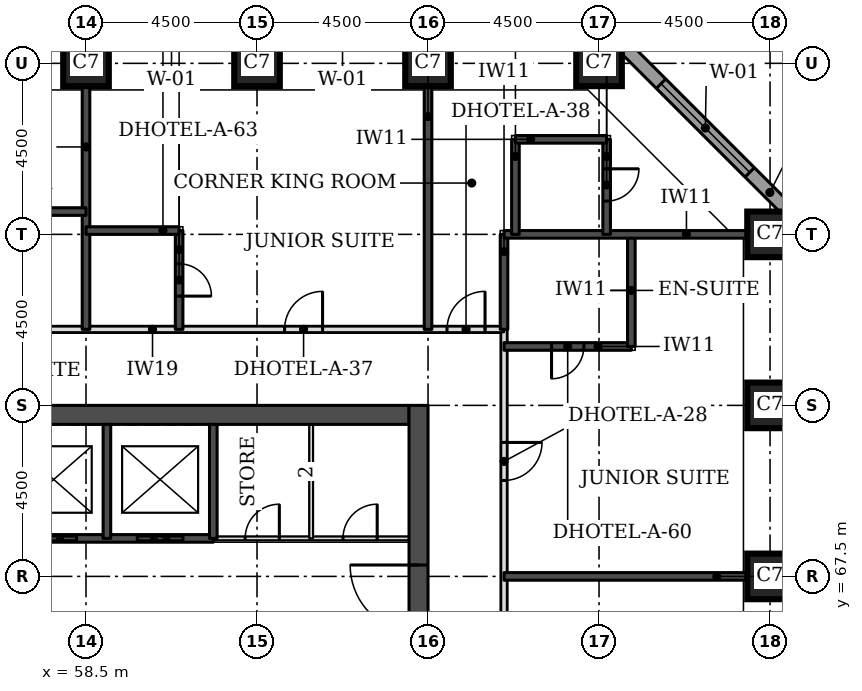
"""IFC4 building model, lengths in metres.
Left out: names, types, materials, properties, quantities, classifications, styles, units other than length and angle.
Written with IfcOpenShell. Run it as: python <this file> out.ifc"""

import sys

from ifc_helpers import new_model, si_unit, direction, frame, frame_2d, origin, origin_2d, place, context, subcontext, project, spatial, rectangle, extrude, element, fill, save


model = new_model("IFC4")
c1 = context("Model", 3, precision=1e-05, world=origin(), true_north=direction((0.0, 1.0)))
c2 = subcontext(c1, "Body", "Model", "MODEL_VIEW")
j1 = project(units=[si_unit("LENGTHUNIT", "METRE"), si_unit("PLANEANGLEUNIT", "RADIAN")], contexts=[c1])
p1 = place(None, origin())
s1 = spatial("IfcSite", under=j1, at=p1, CompositionType="ELEMENT")
p2 = place(p1, origin())
s2 = spatial("IfcBuilding", under=s1, at=p2, CompositionType="ELEMENT")
p3 = place(p2, frame((0.0, 0.0, 49.5)))
s3 = spatial("IfcBuildingStorey", under=s2, at=p3, CompositionType="ELEMENT", Elevation=49.5)
for number, where, z_axis, x_axis in (
    (1, (76.5, 67.5, 0.0), (0.0, 0.0, 1.0), (1.0, 0.0, 0.0)),
    (2, (76.5, 72.0, 0.0), (0.0, 0.0, 1.0), (1.0, 0.0, 0.0)),
    (3, (76.5, 76.5, 0.0), (0.0, 0.0, 1.0), (1.0, 0.0, 0.0)),
    (4, (58.5, 81.0, 0.0), (0.0, 0.0, 1.0), (1.0, 0.0, 0.0)),
    (5, (63.0, 81.0, 0.0), (0.0, 0.0, 1.0), (1.0, 0.0, 0.0)),
    (6, (67.5, 81.0, 0.0), (0.0, 0.0, 1.0), (1.0, 0.0, 0.0)),
    (7, (72.0, 81.0, 0.0), (0.0, 0.0, 1.0), (1.0, 0.0, 0.0)),
):
    element("IfcColumn", number, at=place(p3, frame(where, z_axis=z_axis, x_axis=x_axis)), inside=s3, PredefinedType="COLUMN", context=c2, shape_type="SweptSolid", body=[
        extrude(rectangle(XDim=1.2, YDim=1.2, at=origin_2d()), origin(), (0.0, 0.0, 1.0), 3.3),
    ])
p4 = place(p3, frame((45.5, 71.75, 0.0), z_axis=(0.0, 0.0, 1.0), x_axis=(1.0, 0.0, 0.0)))
e8 = element("IfcWall", 8, at=p4, inside=s3, PredefinedType="SHEAR", context=c2, shape_type="SweptSolid", body=[
    extrude(rectangle(XDim=21.5, YDim=0.5, at=frame_2d((10.75, 0.0))), origin(), (0.0, 0.0, 1.0), 3.3),
])
p5 = place(p3, frame((67.25, 49.5, 0.0), z_axis=(0.0, 0.0, 1.0), x_axis=(0.0, 1.0, 0.0)))
e9 = element("IfcWall", 9, at=p5, inside=s3, PredefinedType="SHEAR", context=c2, shape_type="SweptSolid", body=[
    extrude(rectangle(XDim=22.5, YDim=0.5, at=frame_2d((11.25, 0.0))), origin(), (0.0, 0.0, 1.0), 3.3),
])
p6 = place(p5, frame((4.2, 0.0, 0.0)))
e10 = element("IfcOpeningElement", 10, at=p6, cuts=e9, PredefinedType="OPENING", context=c2, shape_type="SweptSolid", body=[
    extrude(rectangle(XDim=1.8, YDim=2.1, at=frame_2d((0.9, 1.05))), frame((0.0, 0.26, 0.0), z_axis=(0.0, -1.0, 0.0), x_axis=(1.0, 0.0, 0.0)), (0.0, 0.0, 1.0), 0.52),
])
p7 = place(p5, frame((6.9, 0.0, 0.0)))
e11 = element("IfcOpeningElement", 11, at=p7, cuts=e9, PredefinedType="OPENING", context=c2, shape_type="SweptSolid", body=[
    extrude(rectangle(XDim=1.1, YDim=2.1, at=frame_2d((0.55, 1.05))), frame((0.0, 0.26, 0.0), z_axis=(0.0, -1.0, 0.0), x_axis=(1.0, 0.0, 0.0)), (0.0, 0.0, 1.0), 0.52),
])
p8 = place(p5, frame((13.6, 0.0, 0.0)))
e12 = element("IfcOpeningElement", 12, at=p8, cuts=e9, PredefinedType="OPENING", context=c2, shape_type="SweptSolid", body=[
    extrude(rectangle(XDim=1.1, YDim=2.1, at=frame_2d((0.55, 1.05))), frame((0.0, 0.26, 0.0), z_axis=(0.0, -1.0, 0.0), x_axis=(1.0, 0.0, 0.0)), (0.0, 0.0, 1.0), 0.52),
])
p9 = place(p5, frame((16.5, 0.0, 0.0)))
e13 = element("IfcOpeningElement", 13, at=p9, cuts=e9, PredefinedType="OPENING", context=c2, shape_type="SweptSolid", body=[
    extrude(rectangle(XDim=1.8, YDim=2.1, at=frame_2d((0.9, 1.05))), frame((0.0, 0.26, 0.0), z_axis=(0.0, -1.0, 0.0), x_axis=(1.0, 0.0, 0.0)), (0.0, 0.0, 1.0), 0.52),
])
p10 = place(p3, frame((77.326, 76.77, 0.0), z_axis=(0.0, 0.0, 1.0), x_axis=(-0.707106781187, 0.707106781187, 0.0)))
e14 = element("IfcWall", 14, at=p10, inside=s3, PredefinedType="STANDARD", context=c2, shape_type="SweptSolid", body=[
    extrude(rectangle(XDim=7.151, YDim=0.35, at=frame_2d((3.576, 0.0))), origin(), (0.0, 0.0, 1.0), 3.055),
])
p11 = place(p10, frame((1.926, 0.0, 0.8)))
e15 = element("IfcOpeningElement", 15, at=p11, cuts=e14, PredefinedType="OPENING", context=c2, shape_type="SweptSolid", body=[
    extrude(rectangle(XDim=3.3, YDim=1.5, at=frame_2d((1.65, 0.75))), frame((0.0, 0.185, 0.0), z_axis=(0.0, -1.0, 0.0), x_axis=(1.0, 0.0, 0.0)), (0.0, 0.0, 1.0), 0.37),
])
p12 = place(p3, frame((69.5, 47.5, 0.0), z_axis=(0.0, 0.0, 1.0), x_axis=(0.0, 1.0, 0.0)))
e16 = element("IfcWall", 16, at=p12, inside=s3, PredefinedType="PARTITIONING", context=c2, shape_type="SweptSolid", body=[
    extrude(rectangle(XDim=26.5, YDim=0.15, at=frame_2d((13.25, 0.0))), origin(), (0.0, 0.0, 1.0), 3.08),
])
p13 = place(p12, frame((22.525, 0.0, 0.0)))
e17 = element("IfcOpeningElement", 17, at=p13, cuts=e16, PredefinedType="OPENING", context=c2, shape_type="SweptSolid", body=[
    extrude(rectangle(XDim=1.0, YDim=2.1, at=frame_2d((0.5, 1.05))), frame((0.0, 0.085, 0.0), z_axis=(0.0, -1.0, 0.0), x_axis=(1.0, 0.0, 0.0)), (0.0, 0.0, 1.0), 0.17),
])
p14 = place(p12, frame((16.225, 0.0, 0.0)))
e18 = element("IfcOpeningElement", 18, at=p14, cuts=e16, PredefinedType="OPENING", context=c2, shape_type="SweptSolid", body=[
    extrude(rectangle(XDim=1.0, YDim=2.1, at=frame_2d((0.5, 1.05))), frame((0.0, 0.085, 0.0), z_axis=(0.0, -1.0, 0.0), x_axis=(1.0, 0.0, 0.0)), (0.0, 0.0, 1.0), 0.17),
])
p15 = place(p12, frame((4.25, 0.0, 0.0)))
e19 = element("IfcOpeningElement", 19, at=p15, cuts=e16, PredefinedType="OPENING", context=c2, shape_type="SweptSolid", body=[
    extrude(rectangle(XDim=1.1, YDim=2.1, at=frame_2d((0.55, 1.05))), frame((0.0, 0.085, 0.0), z_axis=(0.0, -1.0, 0.0), x_axis=(1.0, 0.0, 0.0)), (0.0, 0.0, 1.0), 0.17),
])
p16 = place(p12, frame((0.447, 0.0, 0.0)))
e20 = element("IfcOpeningElement", 20, at=p16, cuts=e16, PredefinedType="OPENING", context=c2, shape_type="SweptSolid", body=[
    extrude(rectangle(XDim=1.0, YDim=2.1, at=frame_2d((0.5, 1.05))), frame((0.0, 0.085, 0.0), z_axis=(0.0, -1.0, 0.0), x_axis=(1.0, 0.0, 0.0)), (0.0, 0.0, 1.0), 0.17),
])
p17 = place(p3, frame((43.0, 74.0, 0.0), z_axis=(0.0, 0.0, 1.0), x_axis=(1.0, 0.0, 0.0)))
e21 = element("IfcWall", 21, at=p17, inside=s3, PredefinedType="PARTITIONING", context=c2, shape_type="SweptSolid", body=[
    extrude(rectangle(XDim=26.5, YDim=0.15, at=frame_2d((13.25, 0.0))), origin(), (0.0, 0.0, 1.0), 3.08),
])
p18 = place(p17, frame((4.675, 0.0, 0.0)))
e22 = element("IfcOpeningElement", 22, at=p18, cuts=e21, PredefinedType="OPENING", context=c2, shape_type="SweptSolid", body=[
    extrude(rectangle(XDim=1.0, YDim=2.1, at=frame_2d((0.5, 1.05))), frame((0.0, 0.085, 0.0), z_axis=(0.0, -1.0, 0.0), x_axis=(1.0, 0.0, 0.0)), (0.0, 0.0, 1.0), 0.17),
])
p19 = place(p17, frame((9.025, 0.0, 0.0)))
e23 = element("IfcOpeningElement", 23, at=p19, cuts=e21, PredefinedType="OPENING", context=c2, shape_type="SweptSolid", body=[
    extrude(rectangle(XDim=1.0, YDim=2.1, at=frame_2d((0.5, 1.05))), frame((0.0, 0.085, 0.0), z_axis=(0.0, -1.0, 0.0), x_axis=(1.0, 0.0, 0.0)), (0.0, 0.0, 1.0), 0.17),
])
p20 = place(p17, frame((20.725, 0.0, 0.0)))
e24 = element("IfcOpeningElement", 24, at=p20, cuts=e21, PredefinedType="OPENING", context=c2, shape_type="SweptSolid", body=[
    extrude(rectangle(XDim=1.0, YDim=2.1, at=frame_2d((0.5, 1.05))), frame((0.0, 0.085, 0.0), z_axis=(0.0, -1.0, 0.0), x_axis=(1.0, 0.0, 0.0)), (0.0, 0.0, 1.0), 0.17),
])
p21 = place(p17, frame((0.5, 0.0, 0.0)))
e25 = element("IfcOpeningElement", 25, at=p21, cuts=e21, PredefinedType="OPENING", context=c2, shape_type="SweptSolid", body=[
    extrude(rectangle(XDim=1.0, YDim=2.1, at=frame_2d((0.5, 1.05))), frame((0.0, 0.085, 0.0), z_axis=(0.0, -1.0, 0.0), x_axis=(1.0, 0.0, 0.0)), (0.0, 0.0, 1.0), 0.17),
])
p22 = place(p17, frame((25.0, 0.0, 0.0)))
e26 = element("IfcOpeningElement", 26, at=p22, cuts=e21, PredefinedType="OPENING", context=c2, shape_type="SweptSolid", body=[
    extrude(rectangle(XDim=1.0, YDim=2.1, at=frame_2d((0.5, 1.05))), frame((0.0, 0.085, 0.0), z_axis=(0.0, -1.0, 0.0), x_axis=(1.0, 0.0, 0.0)), (0.0, 0.0, 1.0), 0.17),
])
p23 = place(p3, frame((69.5, 67.5, 0.0), z_axis=(0.0, 0.0, 1.0), x_axis=(1.0, 0.0, 0.0)))
e27 = element("IfcWall", 27, at=p23, inside=s3, PredefinedType="SOLIDWALL", context=c2, shape_type="SweptSolid", body=[
    extrude(rectangle(XDim=6.4, YDim=0.2, at=frame_2d((3.2, 0.0))), origin(), (0.0, 0.0, 1.0), 3.08),
])
p24 = place(p3, frame((69.5, 73.55, 0.0), z_axis=(0.0, 0.0, 1.0), x_axis=(1.0, 0.0, 0.0)))
e28 = element("IfcWall", 28, at=p24, inside=s3, PredefinedType="SOLIDWALL", context=c2, shape_type="SweptSolid", body=[
    extrude(rectangle(XDim=3.35, YDim=0.2, at=frame_2d((1.675, 0.0))), origin(), (0.0, 0.0, 1.0), 3.08),
])
p25 = place(p24, frame((1.25, 0.0, 0.0)))
e29 = element("IfcOpeningElement", 29, at=p25, cuts=e28, PredefinedType="OPENING", context=c2, shape_type="SweptSolid", body=[
    extrude(rectangle(XDim=0.85, YDim=2.1, at=frame_2d((0.425, 1.05))), frame((0.0, 0.11, 0.0), z_axis=(0.0, -1.0, 0.0), x_axis=(1.0, 0.0, 0.0)), (0.0, 0.0, 1.0), 0.22),
])
p26 = place(p3, frame((72.85, 73.55, 0.0), z_axis=(0.0, 0.0, 1.0), x_axis=(0.0, 1.0, 0.0)))
e30 = element("IfcWall", 30, at=p26, inside=s3, PredefinedType="SOLIDWALL", context=c2, shape_type="SweptSolid", body=[
    extrude(rectangle(XDim=2.95, YDim=0.2, at=frame_2d((1.475, 0.0))), origin(), (0.0, 0.0, 1.0), 3.08),
])
p27 = place(p3, frame((58.5, 74.0, 0.0), z_axis=(0.0, 0.0, 1.0), x_axis=(0.0, 1.0, 0.0)))
e31 = element("IfcWall", 31, at=p27, inside=s3, PredefinedType="SOLIDWALL", context=c2, shape_type="SweptSolid", body=[
    extrude(rectangle(XDim=6.4, YDim=0.2, at=frame_2d((3.2, 0.0))), origin(), (0.0, 0.0, 1.0), 3.08),
])
p28 = place(p3, frame((60.95, 74.0, 0.0), z_axis=(0.0, 0.0, 1.0), x_axis=(0.0, 1.0, 0.0)))
e32 = element("IfcWall", 32, at=p28, inside=s3, PredefinedType="SOLIDWALL", context=c2, shape_type="SweptSolid", body=[
    extrude(rectangle(XDim=2.6, YDim=0.2, at=frame_2d((1.3, 0.0))), origin(), (0.0, 0.0, 1.0), 3.08),
])
p29 = place(p28, frame((0.875, 0.0, 0.0)))
e33 = element("IfcOpeningElement", 33, at=p29, cuts=e32, PredefinedType="OPENING", context=c2, shape_type="SweptSolid", body=[
    extrude(rectangle(XDim=0.85, YDim=2.1, at=frame_2d((0.425, 1.05))), frame((0.0, 0.11, 0.0), z_axis=(0.0, -1.0, 0.0), x_axis=(1.0, 0.0, 0.0)), (0.0, 0.0, 1.0), 0.22),
])
p30 = place(p3, frame((67.5, 74.0, 0.0), z_axis=(0.0, 0.0, 1.0), x_axis=(0.0, 1.0, 0.0)))
e34 = element("IfcWall", 34, at=p30, inside=s3, PredefinedType="SOLIDWALL", context=c2, shape_type="SweptSolid", body=[
    extrude(rectangle(XDim=6.4, YDim=0.2, at=frame_2d((3.2, 0.0))), origin(), (0.0, 0.0, 1.0), 3.08),
])
p31 = place(p3, frame((69.5, 74.0, 0.0), z_axis=(0.0, 0.0, 1.0), x_axis=(0.0, 1.0, 0.0)))
e35 = element("IfcWall", 35, at=p31, inside=s3, PredefinedType="SOLIDWALL", context=c2, shape_type="SweptSolid", body=[
    extrude(rectangle(XDim=2.5, YDim=0.2, at=frame_2d((1.25, 0.0))), origin(), (0.0, 0.0, 1.0), 3.08),
])
p32 = place(p3, frame((69.5, 76.5, 0.0), z_axis=(0.0, 0.0, 1.0), x_axis=(1.0, 0.0, 0.0)))
e36 = element("IfcWall", 36, at=p32, inside=s3, PredefinedType="SOLIDWALL", context=c2, shape_type="SweptSolid", body=[
    extrude(rectangle(XDim=6.4, YDim=0.2, at=frame_2d((3.2, 0.0))), origin(), (0.0, 0.0, 1.0), 3.08),
])
p33 = place(p3, frame((69.8, 76.5, 0.0), z_axis=(0.0, 0.0, 1.0), x_axis=(0.0, 1.0, 0.0)))
e37 = element("IfcWall", 37, at=p33, inside=s3, PredefinedType="SOLIDWALL", context=c2, shape_type="SweptSolid", body=[
    extrude(rectangle(XDim=2.5, YDim=0.2, at=frame_2d((1.25, 0.0))), origin(), (0.0, 0.0, 1.0), 3.08),
])
p34 = place(p3, frame((72.2, 76.5, 0.0), z_axis=(0.0, 0.0, 1.0), x_axis=(0.0, 1.0, 0.0)))
e38 = element("IfcWall", 38, at=p34, inside=s3, PredefinedType="SOLIDWALL", context=c2, shape_type="SweptSolid", body=[
    extrude(rectangle(XDim=2.5, YDim=0.2, at=frame_2d((1.25, 0.0))), origin(), (0.0, 0.0, 1.0), 3.08),
])
p35 = place(p34, frame((0.875, 0.0, 0.0)))
e39 = element("IfcOpeningElement", 39, at=p35, cuts=e38, PredefinedType="OPENING", context=c2, shape_type="SweptSolid", body=[
    extrude(rectangle(XDim=0.85, YDim=2.1, at=frame_2d((0.425, 1.05))), frame((0.0, 0.11, 0.0), z_axis=(0.0, -1.0, 0.0), x_axis=(1.0, 0.0, 0.0)), (0.0, 0.0, 1.0), 0.22),
])
p36 = place(p3, frame((58.5, 76.6, 0.0), z_axis=(0.0, 0.0, 1.0), x_axis=(1.0, 0.0, 0.0)))
e40 = element("IfcWall", 40, at=p36, inside=s3, PredefinedType="SOLIDWALL", context=c2, shape_type="SweptSolid", body=[
    extrude(rectangle(XDim=2.45, YDim=0.2, at=frame_2d((1.225, 0.0))), origin(), (0.0, 0.0, 1.0), 3.08),
])
p37 = place(p3, frame((55.55, 77.1, 0.0), z_axis=(0.0, 0.0, 1.0), x_axis=(1.0, 0.0, 0.0)))
e41 = element("IfcWall", 41, at=p37, inside=s3, PredefinedType="SOLIDWALL", context=c2, shape_type="SweptSolid", body=[
    extrude(rectangle(XDim=2.95, YDim=0.2, at=frame_2d((1.475, 0.0))), origin(), (0.0, 0.0, 1.0), 3.08),
])
p38 = place(p3, frame((69.8, 79.0, 0.0), z_axis=(0.0, 0.0, 1.0), x_axis=(1.0, 0.0, 0.0)))
e42 = element("IfcWall", 42, at=p38, inside=s3, PredefinedType="SOLIDWALL", context=c2, shape_type="SweptSolid", body=[
    extrude(rectangle(XDim=2.4, YDim=0.2, at=frame_2d((1.2, 0.0))), origin(), (0.0, 0.0, 1.0), 3.08),
])
p39 = place(p3, frame((61.85, 68.5, 0.0), z_axis=(0.0, 0.0, 1.0), x_axis=(1.0, 0.0, 0.0)))
e43 = element("IfcWall", 43, at=p39, inside=s3, PredefinedType="PARTITIONING", context=c2, shape_type="SweptSolid", body=[
    extrude(rectangle(XDim=5.15, YDim=0.1, at=frame_2d((2.575, 0.0))), origin(), (0.0, 0.0, 1.0), 3.08),
])
p40 = place(p39, frame((3.413, 0.0, 0.0)))
e44 = element("IfcOpeningElement", 44, at=p40, cuts=e43, PredefinedType="OPENING", context=c2, shape_type="SweptSolid", body=[
    extrude(rectangle(XDim=0.9, YDim=2.1, at=frame_2d((0.45, 1.05))), frame((0.0, 0.06, 0.0), z_axis=(0.0, -1.0, 0.0), x_axis=(1.0, 0.0, 0.0)), (0.0, 0.0, 1.0), 0.12),
])
p41 = place(p39, frame((0.837, 0.0, 0.0)))
e45 = element("IfcOpeningElement", 45, at=p41, cuts=e43, PredefinedType="OPENING", context=c2, shape_type="SweptSolid", body=[
    extrude(rectangle(XDim=0.9, YDim=2.1, at=frame_2d((0.45, 1.05))), frame((0.0, 0.06, 0.0), z_axis=(0.0, -1.0, 0.0), x_axis=(1.0, 0.0, 0.0)), (0.0, 0.0, 1.0), 0.12),
])
p42 = place(p3, frame((50.65, 68.5, 0.0), z_axis=(0.0, 0.0, 1.0), x_axis=(1.0, 0.0, 0.0)))
e46 = element("IfcWall", 46, at=p42, inside=s3, PredefinedType="SOLIDWALL", context=c2, shape_type="SweptSolid", body=[
    extrude(rectangle(XDim=11.2, YDim=0.2, at=frame_2d((5.6, 0.0))), origin(), (0.0, 0.0, 1.0), 3.08),
])
p43 = place(p42, frame((0.8, 0.0, 0.0)))
e47 = element("IfcOpeningElement", 47, at=p43, cuts=e46, PredefinedType="OPENING", context=c2, shape_type="SweptSolid", body=[
    extrude(rectangle(XDim=1.2, YDim=2.1, at=frame_2d((0.6, 1.05))), frame((0.0, 0.11, 0.0), z_axis=(0.0, -1.0, 0.0), x_axis=(1.0, 0.0, 0.0)), (0.0, 0.0, 1.0), 0.22),
])
p44 = place(p42, frame((3.6, 0.0, 0.0)))
e48 = element("IfcOpeningElement", 48, at=p44, cuts=e46, PredefinedType="OPENING", context=c2, shape_type="SweptSolid", body=[
    extrude(rectangle(XDim=1.2, YDim=2.1, at=frame_2d((0.6, 1.05))), frame((0.0, 0.11, 0.0), z_axis=(0.0, -1.0, 0.0), x_axis=(1.0, 0.0, 0.0)), (0.0, 0.0, 1.0), 0.22),
])
p45 = place(p42, frame((6.4, 0.0, 0.0)))
e49 = element("IfcOpeningElement", 49, at=p45, cuts=e46, PredefinedType="OPENING", context=c2, shape_type="SweptSolid", body=[
    extrude(rectangle(XDim=1.2, YDim=2.1, at=frame_2d((0.6, 1.05))), frame((0.0, 0.11, 0.0), z_axis=(0.0, -1.0, 0.0), x_axis=(1.0, 0.0, 0.0)), (0.0, 0.0, 1.0), 0.22),
])
p46 = place(p42, frame((9.2, 0.0, 0.0)))
e50 = element("IfcOpeningElement", 50, at=p46, cuts=e46, PredefinedType="OPENING", context=c2, shape_type="SweptSolid", body=[
    extrude(rectangle(XDim=1.2, YDim=2.1, at=frame_2d((0.6, 1.05))), frame((0.0, 0.11, 0.0), z_axis=(0.0, -1.0, 0.0), x_axis=(1.0, 0.0, 0.0)), (0.0, 0.0, 1.0), 0.22),
])
for number, where, z_axis, x_axis in (
    (51, (59.05, 68.5, 0.0), (0.0, 0.0, 1.0), (0.0, 1.0, 0.0)),
    (52, (61.85, 68.5, 0.0), (0.0, 0.0, 1.0), (0.0, 1.0, 0.0)),
):
    element("IfcWall", number, at=place(p3, frame(where, z_axis=z_axis, x_axis=x_axis)), inside=s3, PredefinedType="SOLIDWALL", context=c2, shape_type="SweptSolid", body=[
        extrude(rectangle(XDim=3.0, YDim=0.2, at=frame_2d((1.5, 0.0))), origin(), (0.0, 0.0, 1.0), 3.08),
    ])
p47 = place(p3, frame((64.425, 68.5, 0.0), z_axis=(0.0, 0.0, 1.0), x_axis=(0.0, 1.0, 0.0)))
e53 = element("IfcWall", 53, at=p47, inside=s3, PredefinedType="PARTITIONING", context=c2, shape_type="SweptSolid", body=[
    extrude(rectangle(XDim=3.0, YDim=0.1, at=frame_2d((1.5, 0.0))), origin(), (0.0, 0.0, 1.0), 3.08),
])
p48 = place(p11, origin())
e54 = element("IfcWindow", 54, at=p48, inside=s3, PartitioningType="SINGLE_PANEL", PredefinedType="WINDOW", context=c2, shape_type="SweptSolid", body=[
    extrude(rectangle(XDim=3.3, YDim=1.5, at=frame_2d((1.65, 0.75))), frame((0.0, 0.085, 0.0), z_axis=(0.0, -1.0, 0.0), x_axis=(1.0, 0.0, 0.0)), (0.0, 0.0, 1.0), 0.06),
])
fill(e15, e54)
p49 = place(p20, origin())
e55 = element("IfcDoor", 55, at=p49, inside=s3, OperationType="SINGLE_SWING_RIGHT", PredefinedType="DOOR", context=c2, shape_type="SweptSolid", body=[
    extrude(rectangle(XDim=1.0, YDim=2.1, at=frame_2d((0.5, 1.05))), frame((0.0, 0.025, 0.0), z_axis=(0.0, -1.0, 0.0), x_axis=(1.0, 0.0, 0.0)), (0.0, 0.0, 1.0), 0.05),
])
fill(e24, e55)
p50 = place(p29, frame((0.85, 0.0, 0.0), z_axis=(0.0, 0.0, 1.0), x_axis=(-1.0, 0.0, 0.0)))
e56 = element("IfcDoor", 56, at=p50, inside=s3, OperationType="SINGLE_SWING_RIGHT", PredefinedType="DOOR", context=c2, shape_type="SweptSolid", body=[
    extrude(rectangle(XDim=0.85, YDim=2.1, at=frame_2d((0.425, 1.05))), frame((0.0, 0.025, 0.0), z_axis=(0.0, -1.0, 0.0), x_axis=(1.0, 0.0, 0.0)), (0.0, 0.0, 1.0), 0.05),
])
fill(e33, e56)
p51 = place(p13, frame((1.0, 0.0, 0.0), z_axis=(0.0, 0.0, 1.0), x_axis=(-1.0, 0.0, 0.0)))
e57 = element("IfcDoor", 57, at=p51, inside=s3, OperationType="SINGLE_SWING_LEFT", PredefinedType="DOOR", context=c2, shape_type="SweptSolid", body=[
    extrude(rectangle(XDim=1.0, YDim=2.1, at=frame_2d((0.5, 1.05))), frame((0.0, 0.025, 0.0), z_axis=(0.0, -1.0, 0.0), x_axis=(1.0, 0.0, 0.0)), (0.0, 0.0, 1.0), 0.05),
])
fill(e17, e57)
p52 = place(p25, frame((0.85, 0.0, 0.0), z_axis=(0.0, 0.0, 1.0), x_axis=(-1.0, 0.0, 0.0)))
e58 = element("IfcDoor", 58, at=p52, inside=s3, OperationType="SINGLE_SWING_RIGHT", PredefinedType="DOOR", context=c2, shape_type="SweptSolid", body=[
    extrude(rectangle(XDim=0.85, YDim=2.1, at=frame_2d((0.425, 1.05))), frame((0.0, 0.025, 0.0), z_axis=(0.0, -1.0, 0.0), x_axis=(1.0, 0.0, 0.0)), (0.0, 0.0, 1.0), 0.05),
])
fill(e29, e58)
p53 = place(p22, origin())
e59 = element("IfcDoor", 59, at=p53, inside=s3, OperationType="SINGLE_SWING_RIGHT", PredefinedType="DOOR", context=c2, shape_type="SweptSolid", body=[
    extrude(rectangle(XDim=1.0, YDim=2.1, at=frame_2d((0.5, 1.05))), frame((0.0, 0.025, 0.0), z_axis=(0.0, -1.0, 0.0), x_axis=(1.0, 0.0, 0.0)), (0.0, 0.0, 1.0), 0.05),
])
fill(e26, e59)
p54 = place(p35, frame((0.85, 0.0, 0.0), z_axis=(0.0, 0.0, 1.0), x_axis=(-1.0, 0.0, 0.0)))
e60 = element("IfcDoor", 60, at=p54, inside=s3, OperationType="SINGLE_SWING_LEFT", PredefinedType="DOOR", context=c2, shape_type="SweptSolid", body=[
    extrude(rectangle(XDim=0.85, YDim=2.1, at=frame_2d((0.425, 1.05))), frame((0.0, 0.025, 0.0), z_axis=(0.0, -1.0, 0.0), x_axis=(1.0, 0.0, 0.0)), (0.0, 0.0, 1.0), 0.05),
])
fill(e39, e60)
p55 = place(p45, origin())
e61 = element("IfcDoor", 61, at=p55, inside=s3, OperationType="DOUBLE_DOOR_SLIDING", PredefinedType="DOOR", context=c2, shape_type="SweptSolid", body=[
    extrude(rectangle(XDim=1.2, YDim=2.1, at=frame_2d((0.6, 1.05))), frame((0.0, 0.025, 0.0), z_axis=(0.0, -1.0, 0.0), x_axis=(1.0, 0.0, 0.0)), (0.0, 0.0, 1.0), 0.05),
])
fill(e49, e61)
p56 = place(p46, origin())
e62 = element("IfcDoor", 62, at=p56, inside=s3, OperationType="DOUBLE_DOOR_SLIDING", PredefinedType="DOOR", context=c2, shape_type="SweptSolid", body=[
    extrude(rectangle(XDim=1.2, YDim=2.1, at=frame_2d((0.6, 1.05))), frame((0.0, 0.025, 0.0), z_axis=(0.0, -1.0, 0.0), x_axis=(1.0, 0.0, 0.0)), (0.0, 0.0, 1.0), 0.05),
])
fill(e50, e62)
p57 = place(p9, origin())
e63 = element("IfcDoor", 63, at=p57, inside=s3, OperationType="SINGLE_SWING_RIGHT", PredefinedType="DOOR", context=c2, shape_type="SweptSolid", body=[
    extrude(rectangle(XDim=1.8, YDim=2.1, at=frame_2d((0.9, 1.05))), frame((0.0, 0.025, 0.0), z_axis=(0.0, -1.0, 0.0), x_axis=(1.0, 0.0, 0.0)), (0.0, 0.0, 1.0), 0.05),
])
fill(e13, e63)
p58 = place(p40, origin())
e64 = element("IfcDoor", 64, at=p58, inside=s3, OperationType="SINGLE_SWING_RIGHT", PredefinedType="DOOR", context=c2, shape_type="SweptSolid", body=[
    extrude(rectangle(XDim=0.9, YDim=2.1, at=frame_2d((0.45, 1.05))), frame((0.0, 0.025, 0.0), z_axis=(0.0, -1.0, 0.0), x_axis=(1.0, 0.0, 0.0)), (0.0, 0.0, 1.0), 0.05),
])
fill(e44, e64)
p59 = place(p41, origin())
e65 = element("IfcDoor", 65, at=p59, inside=s3, OperationType="SINGLE_SWING_RIGHT", PredefinedType="DOOR", context=c2, shape_type="SweptSolid", body=[
    extrude(rectangle(XDim=0.9, YDim=2.1, at=frame_2d((0.45, 1.05))), frame((0.0, 0.025, 0.0), z_axis=(0.0, -1.0, 0.0), x_axis=(1.0, 0.0, 0.0)), (0.0, 0.0, 1.0), 0.05),
])
fill(e45, e65)
save(model, sys.argv[1])
